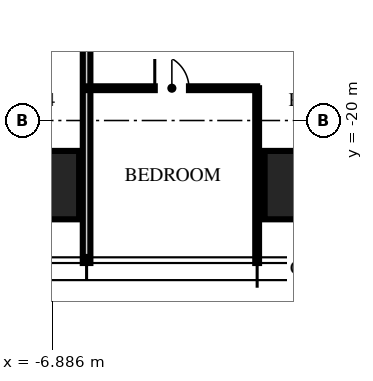
"""IFC4 building model, lengths in metres.
Left out: names, types, materials, properties, quantities, classifications, styles, units other than length and angle.
Written with IfcOpenShell. Run it as: python <this file> out.ifc"""

import sys

from ifc_helpers import new_model, si_unit, direction, frame, frame_2d, origin, origin_2d, place, context, subcontext, project, spatial, rectangle, extrude, element, fill, save


model = new_model("IFC4")
c1 = context("Model", 3, precision=1e-05, world=origin(), true_north=direction((0.0, 1.0)))
c2 = subcontext(c1, "Body", "Model", "MODEL_VIEW")
j1 = project(units=[si_unit("LENGTHUNIT", "METRE"), si_unit("PLANEANGLEUNIT", "RADIAN")], contexts=[c1])
p1 = place(None, origin())
s1 = spatial("IfcSite", under=j1, at=p1, CompositionType="ELEMENT")
p2 = place(p1, origin())
s2 = spatial("IfcBuilding", under=s1, at=p2, CompositionType="ELEMENT")
p3 = place(p2, frame((0.0, 0.0, 293.25)))
s3 = spatial("IfcBuildingStorey", under=s2, at=p3, CompositionType="ELEMENT", Elevation=293.25)
for number, where, z_axis, x_axis in (
    (1, (0.0, -21.7, 0.0), (0.0, 0.0, 1.0), (1.0, 0.0, 0.0)),
    (2, (-7.48, -21.7, 0.0), (0.0, 0.0, 1.0), (1.0, 0.0, 0.0)),
):
    element("IfcColumn", number, at=place(p3, frame(where, z_axis=z_axis, x_axis=x_axis)), inside=s3, PredefinedType="COLUMN", context=c2, shape_type="SweptSolid", body=[
        extrude(rectangle(XDim=2.6, YDim=1.8, at=origin_2d()), origin(), (0.0, 0.0, 1.0), 3.75),
    ])
p4 = place(p3, frame((-5.984, -12.65, 0.0), z_axis=(0.0, 0.0, 1.0), x_axis=(0.0, -1.0, 0.0)))
e3 = element("IfcWall", 3, at=p4, inside=s3, PredefinedType="PARTITIONING", context=c2, shape_type="SweptSolid", body=[
    extrude(rectangle(XDim=11.1, YDim=0.2, at=frame_2d((5.55, 0.0))), origin(), (0.0, 0.0, 1.0), 3.01),
])
p5 = place(p3, frame((-1.496, -19.15, 0.0), z_axis=(0.0, 0.0, 1.0), x_axis=(0.0, -1.0, 0.0)))
e4 = element("IfcWall", 4, at=p5, inside=s3, PredefinedType="PARTITIONING", context=c2, shape_type="SweptSolid", body=[
    extrude(rectangle(XDim=4.6, YDim=0.1, at=frame_2d((2.3, 0.0))), origin(), (0.0, 0.0, 1.0), 3.01),
])
p6 = place(p3, frame((-5.984, -19.15, 0.0), z_axis=(0.0, 0.0, 1.0), x_axis=(1.0, 0.0, 0.0)))
e5 = element("IfcWall", 5, at=p6, inside=s3, PredefinedType="PARTITIONING", context=c2, shape_type="SweptSolid", body=[
    extrude(rectangle(XDim=4.488, YDim=0.1, at=frame_2d((2.244, 0.0))), origin(), (0.0, 0.0, 1.0), 2.91),
])
p7 = place(p6, frame((1.794, 0.0, 0.0)))
e6 = element("IfcOpeningElement", 6, at=p7, cuts=e5, PredefinedType="OPENING", context=c2, shape_type="SweptSolid", body=[
    extrude(rectangle(XDim=0.9, YDim=2.1, at=frame_2d((0.45, 1.05))), frame((0.0, 0.06, 0.0), z_axis=(0.0, -1.0, 0.0), x_axis=(1.0, 0.0, 0.0)), (0.0, 0.0, 1.0), 0.12),
])
p8 = place(p7, origin())
e7 = element("IfcDoor", 7, at=p8, inside=s3, OperationType="SINGLE_SWING_LEFT", PredefinedType="DOOR", context=c2, shape_type="SweptSolid", body=[
    extrude(rectangle(XDim=0.9, YDim=2.1, at=frame_2d((0.45, 1.05))), frame((0.0, 0.025, 0.0), z_axis=(0.0, -1.0, 0.0), x_axis=(1.0, 0.0, 0.0)), (0.0, 0.0, 1.0), 0.05),
])
fill(e6, e7)
save(model, sys.argv[1])
